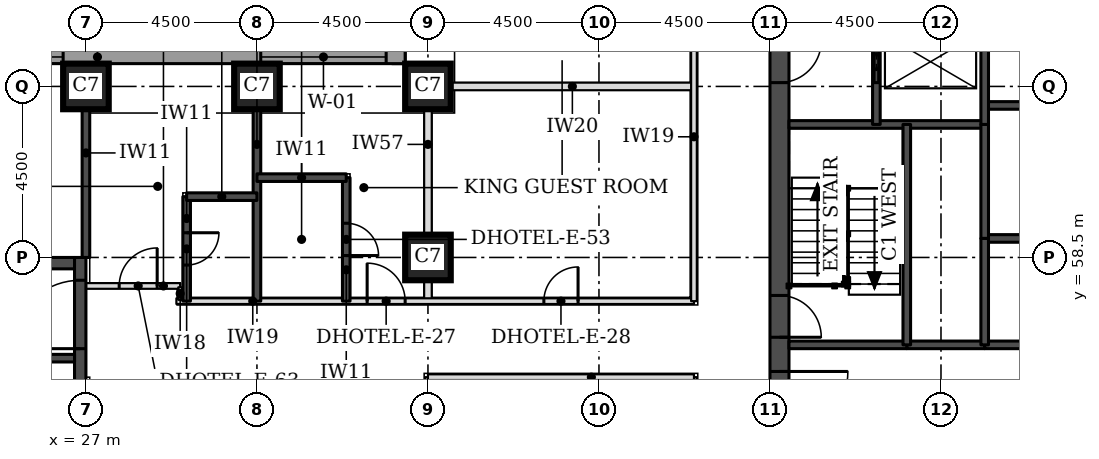
"""IFC4 building model, lengths in metres.
Left out: names, types, materials, properties, quantities, classifications, styles, units other than length and angle.
Written with IfcOpenShell. Run it as: python <this file> out.ifc"""

import sys

from ifc_helpers import new_model, si_unit, direction, frame, frame_2d, origin, origin_2d, place, context, subcontext, project, spatial, rectangle, extrude, element, fill, save


model = new_model("IFC4")
c1 = context("Model", 3, precision=1e-05, world=origin(), true_north=direction((0.0, 1.0)))
c2 = subcontext(c1, "Body", "Model", "MODEL_VIEW")
j1 = project(units=[si_unit("LENGTHUNIT", "METRE"), si_unit("PLANEANGLEUNIT", "RADIAN")], contexts=[c1])
p1 = place(None, origin())
s1 = spatial("IfcSite", under=j1, at=p1, CompositionType="ELEMENT")
p2 = place(p1, origin())
s2 = spatial("IfcBuilding", under=s1, at=p2, CompositionType="ELEMENT")
p3 = place(p2, frame((0.0, 0.0, 62.7)))
s3 = spatial("IfcBuildingStorey", under=s2, at=p3, CompositionType="ELEMENT", Elevation=62.7)
for number, where, z_axis, x_axis in (
    (1, (36.0, 58.5, 0.0), (0.0, 0.0, 1.0), (1.0, 0.0, 0.0)),
    (2, (27.0, 63.0, 0.0), (0.0, 0.0, 1.0), (1.0, 0.0, 0.0)),
    (3, (31.5, 63.0, 0.0), (0.0, 0.0, 1.0), (1.0, 0.0, 0.0)),
    (4, (36.0, 63.0, 0.0), (0.0, 0.0, 1.0), (1.0, 0.0, 0.0)),
):
    element("IfcColumn", number, at=place(p3, frame(where, z_axis=z_axis, x_axis=x_axis)), inside=s3, PredefinedType="COLUMN", context=c2, shape_type="SweptSolid", body=[
        extrude(rectangle(XDim=1.2, YDim=1.2, at=origin_2d()), origin(), (0.0, 0.0, 1.0), 3.3),
    ])
p4 = place(p3, frame((45.25, 49.5, 0.0), z_axis=(0.0, 0.0, 1.0), x_axis=(0.0, 1.0, 0.0)))
e5 = element("IfcWall", 5, at=p4, inside=s3, PredefinedType="SHEAR", context=c2, shape_type="SweptSolid", body=[
    extrude(rectangle(XDim=22.5, YDim=0.5, at=frame_2d((11.25, 0.0))), origin(), (0.0, 0.0, 1.0), 3.3),
])
p5 = place(p4, frame((4.2, 0.0, 0.0)))
e6 = element("IfcOpeningElement", 6, at=p5, cuts=e5, PredefinedType="OPENING", context=c2, shape_type="SweptSolid", body=[
    extrude(rectangle(XDim=1.8, YDim=2.1, at=frame_2d((0.9, 1.05))), frame((0.0, 0.26, 0.0), z_axis=(0.0, -1.0, 0.0), x_axis=(1.0, 0.0, 0.0)), (0.0, 0.0, 1.0), 0.52),
])
p6 = place(p4, frame((6.9, 0.0, 0.0)))
e7 = element("IfcOpeningElement", 7, at=p6, cuts=e5, PredefinedType="OPENING", context=c2, shape_type="SweptSolid", body=[
    extrude(rectangle(XDim=1.1, YDim=2.1, at=frame_2d((0.55, 1.05))), frame((0.0, 0.26, 0.0), z_axis=(0.0, -1.0, 0.0), x_axis=(1.0, 0.0, 0.0)), (0.0, 0.0, 1.0), 0.52),
])
p7 = place(p4, frame((13.6, 0.0, 0.0)))
e8 = element("IfcOpeningElement", 8, at=p7, cuts=e5, PredefinedType="OPENING", context=c2, shape_type="SweptSolid", body=[
    extrude(rectangle(XDim=1.1, YDim=2.1, at=frame_2d((0.55, 1.05))), frame((0.0, 0.26, 0.0), z_axis=(0.0, -1.0, 0.0), x_axis=(1.0, 0.0, 0.0)), (0.0, 0.0, 1.0), 0.52),
])
p8 = place(p4, frame((16.5, 0.0, 0.0)))
e9 = element("IfcOpeningElement", 9, at=p8, cuts=e5, PredefinedType="OPENING", context=c2, shape_type="SweptSolid", body=[
    extrude(rectangle(XDim=1.8, YDim=2.1, at=frame_2d((0.9, 1.05))), frame((0.0, 0.26, 0.0), z_axis=(0.0, -1.0, 0.0), x_axis=(1.0, 0.0, 0.0)), (0.0, 0.0, 1.0), 0.52),
])
p9 = place(p3, frame((18.3, 58.35, 0.0), z_axis=(0.0, 0.0, 1.0), x_axis=(1.0, 0.0, 0.0)))
e10 = element("IfcWall", 10, at=p9, inside=s3, PredefinedType="SHEAR", context=c2, shape_type="SweptSolid", body=[
    extrude(rectangle(XDim=8.4, YDim=0.3, at=frame_2d((4.2, 0.0))), origin(), (0.0, 0.0, 1.0), 3.3),
])
p10 = place(p3, frame((26.85, 49.5, 0.0), z_axis=(0.0, 0.0, 1.0), x_axis=(0.0, 1.0, 0.0)))
e11 = element("IfcWall", 11, at=p10, inside=s3, PredefinedType="SHEAR", context=c2, shape_type="SweptSolid", body=[
    extrude(rectangle(XDim=9.0, YDim=0.3, at=frame_2d((4.5, 0.0))), origin(), (0.0, 0.0, 1.0), 3.3),
])
p11 = place(p10, frame((6.6, 0.0, 0.0)))
e12 = element("IfcOpeningElement", 12, at=p11, cuts=e11, PredefinedType="OPENING", context=c2, shape_type="SweptSolid", body=[
    extrude(rectangle(XDim=1.8, YDim=2.1, at=frame_2d((0.9, 1.05))), frame((0.0, 0.16, 0.0), z_axis=(0.0, -1.0, 0.0), x_axis=(1.0, 0.0, 0.0)), (0.0, 0.0, 1.0), 0.32),
])
p12 = place(p3, frame((35.225, 76.894, 0.0), z_axis=(0.0, 0.0, 1.0), x_axis=(0.0, -1.0, 0.0)))
e13 = element("IfcWall", 13, at=p12, inside=s3, PredefinedType="STANDARD", context=c2, shape_type="SweptSolid", body=[
    extrude(rectangle(XDim=13.293, YDim=0.35, at=frame_2d((6.647, 0.0))), origin(), (0.0, 0.0, 1.0), 3.055),
])
p13 = place(p12, frame((9.493, 0.0, 0.8)))
e14 = element("IfcOpeningElement", 14, at=p13, cuts=e13, PredefinedType="OPENING", context=c2, shape_type="SweptSolid", body=[
    extrude(rectangle(XDim=3.3, YDim=1.5, at=frame_2d((1.65, 0.75))), frame((0.0, 0.185, 0.0), z_axis=(0.0, -1.0, 0.0), x_axis=(1.0, 0.0, 0.0)), (0.0, 0.0, 1.0), 0.37),
])
p14 = place(p3, frame((35.4, 63.775, 0.0), z_axis=(0.0, 0.0, 1.0), x_axis=(-1.0, 0.0, 0.0)))
e15 = element("IfcWall", 15, at=p14, inside=s3, PredefinedType="STANDARD", context=c2, shape_type="SweptSolid", body=[
    extrude(rectangle(XDim=17.793, YDim=0.35, at=frame_2d((8.897, 0.0))), origin(), (0.0, 0.0, 1.0), 3.055),
])
p15 = place(p14, frame((0.5, 0.0, 0.8)))
e16 = element("IfcOpeningElement", 16, at=p15, cuts=e15, PredefinedType="OPENING", context=c2, shape_type="SweptSolid", body=[
    extrude(rectangle(XDim=3.3, YDim=1.5, at=frame_2d((1.65, 0.75))), frame((0.0, 0.185, 0.0), z_axis=(0.0, -1.0, 0.0), x_axis=(1.0, 0.0, 0.0)), (0.0, 0.0, 1.0), 0.37),
])
p16 = place(p14, frame((9.0, 0.0, 0.8)))
e17 = element("IfcOpeningElement", 17, at=p16, cuts=e15, PredefinedType="OPENING", context=c2, shape_type="SweptSolid", body=[
    extrude(rectangle(XDim=3.3, YDim=1.5, at=frame_2d((1.65, 0.75))), frame((0.0, 0.185, 0.0), z_axis=(0.0, -1.0, 0.0), x_axis=(1.0, 0.0, 0.0)), (0.0, 0.0, 1.0), 0.37),
])
p17 = place(p3, frame((36.0, 57.35, 0.0), z_axis=(0.0, 0.0, 1.0), x_axis=(0.0, 1.0, 0.0)))
e18 = element("IfcWall", 18, at=p17, inside=s3, PredefinedType="PARTITIONING", context=c2, shape_type="SweptSolid", body=[
    extrude(rectangle(XDim=5.05, YDim=0.2, at=frame_2d((2.525, 0.0))), origin(), (0.0, 0.0, 1.0), 2.33),
])
p18 = place(p3, frame((36.6, 63.0, 0.0), z_axis=(0.0, 0.0, 1.0), x_axis=(1.0, 0.0, 0.0)))
e19 = element("IfcWall", 19, at=p18, inside=s3, PredefinedType="PARTITIONING", context=c2, shape_type="SweptSolid", body=[
    extrude(rectangle(XDim=6.4, YDim=0.2, at=frame_2d((3.2, 0.0))), origin(), (0.0, 0.0, 1.0), 3.08),
])
p19 = place(p3, frame((43.0, 47.5, 0.0), z_axis=(0.0, 0.0, 1.0), x_axis=(0.0, 1.0, 0.0)))
e20 = element("IfcWall", 20, at=p19, inside=s3, PredefinedType="PARTITIONING", context=c2, shape_type="SweptSolid", body=[
    extrude(rectangle(XDim=7.85, YDim=0.15, at=frame_2d((3.925, 0.0))), origin(), (0.0, 0.0, 1.0), 3.08),
])
p20 = place(p19, frame((3.475, 0.0, 0.0)))
e21 = element("IfcOpeningElement", 21, at=p20, cuts=e20, PredefinedType="OPENING", context=c2, shape_type="SweptSolid", body=[
    extrude(rectangle(XDim=0.9, YDim=2.1, at=frame_2d((0.45, 1.05))), frame((0.0, 0.085, 0.0), z_axis=(0.0, -1.0, 0.0), x_axis=(1.0, 0.0, 0.0)), (0.0, 0.0, 1.0), 0.17),
])
p21 = place(p3, frame((36.0, 54.05, 0.0), z_axis=(0.0, 0.0, 1.0), x_axis=(0.0, 1.0, 0.0)))
e22 = element("IfcWall", 22, at=p21, inside=s3, PredefinedType="PARTITIONING", context=c2, shape_type="SweptSolid", body=[
    extrude(rectangle(XDim=1.3, YDim=0.15, at=frame_2d((0.65, 0.0))), origin(), (0.0, 0.0, 1.0), 2.33),
])
p22 = place(p3, frame((36.0, 55.35, 0.0), z_axis=(0.0, 0.0, 1.0), x_axis=(1.0, 0.0, 0.0)))
e23 = element("IfcWall", 23, at=p22, inside=s3, PredefinedType="PARTITIONING", context=c2, shape_type="SweptSolid", body=[
    extrude(rectangle(XDim=7.0, YDim=0.15, at=frame_2d((3.5, 0.0))), origin(), (0.0, 0.0, 1.0), 3.08),
])
p23 = place(p3, frame((29.38, 57.35, 0.0), z_axis=(0.0, 0.0, 1.0), x_axis=(1.0, 0.0, 0.0)))
e24 = element("IfcWall", 24, at=p23, inside=s3, PredefinedType="PARTITIONING", context=c2, shape_type="SweptSolid", body=[
    extrude(rectangle(XDim=13.62, YDim=0.15, at=frame_2d((6.81, 0.0))), origin(), (0.0, 0.0, 1.0), 3.08),
])
p24 = place(p23, frame((5.02, 0.0, 0.0)))
e25 = element("IfcOpeningElement", 25, at=p24, cuts=e24, PredefinedType="OPENING", context=c2, shape_type="SweptSolid", body=[
    extrude(rectangle(XDim=1.0, YDim=2.1, at=frame_2d((0.5, 1.05))), frame((0.0, 0.085, 0.0), z_axis=(0.0, -1.0, 0.0), x_axis=(1.0, 0.0, 0.0)), (0.0, 0.0, 1.0), 0.17),
])
p25 = place(p23, frame((9.67, 0.0, 0.0)))
e26 = element("IfcOpeningElement", 26, at=p25, cuts=e24, PredefinedType="OPENING", context=c2, shape_type="SweptSolid", body=[
    extrude(rectangle(XDim=0.9, YDim=2.1, at=frame_2d((0.45, 1.05))), frame((0.0, 0.085, 0.0), z_axis=(0.0, -1.0, 0.0), x_axis=(1.0, 0.0, 0.0)), (0.0, 0.0, 1.0), 0.17),
])
p26 = place(p3, frame((43.0, 57.35, 0.0), z_axis=(0.0, 0.0, 1.0), x_axis=(0.0, 1.0, 0.0)))
e27 = element("IfcWall", 27, at=p26, inside=s3, PredefinedType="PARTITIONING", context=c2, shape_type="SweptSolid", body=[
    extrude(rectangle(XDim=16.65, YDim=0.15, at=frame_2d((8.325, 0.0))), origin(), (0.0, 0.0, 1.0), 3.08),
])
p27 = place(p26, frame((8.425, 0.0, 0.0)))
e28 = element("IfcOpeningElement", 28, at=p27, cuts=e27, PredefinedType="OPENING", context=c2, shape_type="SweptSolid", body=[
    extrude(rectangle(XDim=1.0, YDim=2.1, at=frame_2d((0.5, 1.05))), frame((0.0, 0.085, 0.0), z_axis=(0.0, -1.0, 0.0), x_axis=(1.0, 0.0, 0.0)), (0.0, 0.0, 1.0), 0.17),
])
p28 = place(p26, frame((15.203, 0.0, 0.0)))
e29 = element("IfcOpeningElement", 29, at=p28, cuts=e27, PredefinedType="OPENING", context=c2, shape_type="SweptSolid", body=[
    extrude(rectangle(XDim=1.0, YDim=2.1, at=frame_2d((0.5, 1.05))), frame((0.0, 0.085, 0.0), z_axis=(0.0, -1.0, 0.0), x_axis=(1.0, 0.0, 0.0)), (0.0, 0.0, 1.0), 0.17),
])
p29 = place(p3, frame((27.0, 58.5, 0.0), z_axis=(0.0, 0.0, 1.0), x_axis=(0.0, 1.0, 0.0)))
e30 = element("IfcWall", 30, at=p29, inside=s3, PredefinedType="SOLIDWALL", context=c2, shape_type="SweptSolid", body=[
    extrude(rectangle(XDim=3.9, YDim=0.2, at=frame_2d((1.95, 0.0))), origin(), (0.0, 0.0, 1.0), 3.08),
])
p30 = place(p3, frame((29.65, 57.35, 0.0), z_axis=(0.0, 0.0, 1.0), x_axis=(0.0, 1.0, 0.0)))
e31 = element("IfcWall", 31, at=p30, inside=s3, PredefinedType="SOLIDWALL", context=c2, shape_type="SweptSolid", body=[
    extrude(rectangle(XDim=2.75, YDim=0.2, at=frame_2d((1.375, 0.0))), origin(), (0.0, 0.0, 1.0), 3.08),
])
p31 = place(p30, frame((0.95, 0.0, 0.0)))
e32 = element("IfcOpeningElement", 32, at=p31, cuts=e31, PredefinedType="OPENING", context=c2, shape_type="SweptSolid", body=[
    extrude(rectangle(XDim=0.85, YDim=2.1, at=frame_2d((0.425, 1.05))), frame((0.0, 0.11, 0.0), z_axis=(0.0, -1.0, 0.0), x_axis=(1.0, 0.0, 0.0)), (0.0, 0.0, 1.0), 0.22),
])
p32 = place(p3, frame((31.5, 57.35, 0.0), z_axis=(0.0, 0.0, 1.0), x_axis=(0.0, 1.0, 0.0)))
e33 = element("IfcWall", 33, at=p32, inside=s3, PredefinedType="SOLIDWALL", context=c2, shape_type="SweptSolid", body=[
    extrude(rectangle(XDim=5.05, YDim=0.2, at=frame_2d((2.525, 0.0))), origin(), (0.0, 0.0, 1.0), 3.08),
])
p33 = place(p3, frame((33.85, 57.35, 0.0), z_axis=(0.0, 0.0, 1.0), x_axis=(0.0, 1.0, 0.0)))
e34 = element("IfcWall", 34, at=p33, inside=s3, PredefinedType="SOLIDWALL", context=c2, shape_type="SweptSolid", body=[
    extrude(rectangle(XDim=3.25, YDim=0.2, at=frame_2d((1.625, 0.0))), origin(), (0.0, 0.0, 1.0), 3.08),
])
p34 = place(p33, frame((1.2, 0.0, 0.0)))
e35 = element("IfcOpeningElement", 35, at=p34, cuts=e34, PredefinedType="OPENING", context=c2, shape_type="SweptSolid", body=[
    extrude(rectangle(XDim=0.85, YDim=2.1, at=frame_2d((0.425, 1.05))), frame((0.0, 0.11, 0.0), z_axis=(0.0, -1.0, 0.0), x_axis=(1.0, 0.0, 0.0)), (0.0, 0.0, 1.0), 0.22),
])
p35 = place(p3, frame((29.65, 60.1, 0.0), z_axis=(0.0, 0.0, 1.0), x_axis=(1.0, 0.0, 0.0)))
e36 = element("IfcWall", 36, at=p35, inside=s3, PredefinedType="SOLIDWALL", context=c2, shape_type="SweptSolid", body=[
    extrude(rectangle(XDim=1.85, YDim=0.2, at=frame_2d((0.925, 0.0))), origin(), (0.0, 0.0, 1.0), 3.08),
])
p36 = place(p3, frame((31.5, 60.6, 0.0), z_axis=(0.0, 0.0, 1.0), x_axis=(1.0, 0.0, 0.0)))
e37 = element("IfcWall", 37, at=p36, inside=s3, PredefinedType="SOLIDWALL", context=c2, shape_type="SweptSolid", body=[
    extrude(rectangle(XDim=2.35, YDim=0.2, at=frame_2d((1.175, 0.0))), origin(), (0.0, 0.0, 1.0), 3.08),
])
p37 = place(p3, frame((27.0, 57.75, 0.0), z_axis=(0.0, 0.0, 1.0), x_axis=(1.0, 0.0, 0.0)))
e38 = element("IfcWall", 38, at=p37, inside=s3, PredefinedType="PARTITIONING", context=c2, shape_type="SweptSolid", body=[
    extrude(rectangle(XDim=2.48, YDim=0.15, at=frame_2d((1.24, 0.0))), origin(), (0.0, 0.0, 1.0), 3.08),
])
p38 = place(p37, frame((0.875, 0.0, 0.0)))
e39 = element("IfcOpeningElement", 39, at=p38, cuts=e38, PredefinedType="OPENING", context=c2, shape_type="SweptSolid", body=[
    extrude(rectangle(XDim=1.0, YDim=2.1, at=frame_2d((0.5, 1.05))), frame((0.0, 0.085, 0.0), z_axis=(0.0, -1.0, 0.0), x_axis=(1.0, 0.0, 0.0)), (0.0, 0.0, 1.0), 0.17),
])
p39 = place(p3, frame((29.48, 57.385, 0.0), z_axis=(0.0, 0.0, 1.0), x_axis=(0.0, 1.0, 0.0)))
e40 = element("IfcWall", 40, at=p39, inside=s3, PredefinedType="PARTITIONING", context=c2, shape_type="SweptSolid", body=[
    extrude(rectangle(XDim=0.33, YDim=0.1, at=frame_2d((0.165, 0.0))), origin(), (0.0, 0.0, 1.0), 3.08),
])
p40 = place(p3, frame((48.6, 56.2, 0.0), z_axis=(0.0, 0.0, 1.0), x_axis=(1.0, 0.0, 0.0)))
e41 = element("IfcWall", 41, at=p40, inside=s3, PredefinedType="SOLIDWALL", context=c2, shape_type="SweptSolid", body=[
    extrude(rectangle(XDim=2.05, YDim=0.2, at=frame_2d((1.025, 0.0))), origin(), (0.0, 0.0, 1.0), 3.08),
])
p41 = place(p3, frame((45.5, 56.2, 0.0), z_axis=(0.0, 0.0, 1.0), x_axis=(1.0, 0.0, 0.0)))
e42 = element("IfcWall", 42, at=p41, inside=s3, PredefinedType="SOLIDWALL", context=c2, shape_type="SweptSolid", body=[
    extrude(rectangle(XDim=3.1, YDim=0.2, at=frame_2d((1.55, 0.0))), origin(), (0.0, 0.0, 1.0), 3.08),
])
p42 = place(p3, frame((50.65, 56.2, 0.0), z_axis=(0.0, 0.0, 1.0), x_axis=(1.0, 0.0, 0.0)))
e43 = element("IfcWall", 43, at=p42, inside=s3, PredefinedType="SOLIDWALL", context=c2, shape_type="SweptSolid", body=[
    extrude(rectangle(XDim=11.2, YDim=0.2, at=frame_2d((5.6, 0.0))), origin(), (0.0, 0.0, 1.0), 3.08),
])
p43 = place(p3, frame((50.65, 59.0, 0.0), z_axis=(0.0, 0.0, 1.0), x_axis=(1.0, 0.0, 0.0)))
e44 = element("IfcWall", 44, at=p43, inside=s3, PredefinedType="SOLIDWALL", context=c2, shape_type="SweptSolid", body=[
    extrude(rectangle(XDim=11.2, YDim=0.2, at=frame_2d((5.6, 0.0))), origin(), (0.0, 0.0, 1.0), 3.3),
])
p44 = place(p3, frame((45.5, 62.0, 0.0), z_axis=(0.0, 0.0, 1.0), x_axis=(1.0, 0.0, 0.0)))
e45 = element("IfcWall", 45, at=p44, inside=s3, PredefinedType="SOLIDWALL", context=c2, shape_type="SweptSolid", body=[
    extrude(rectangle(XDim=5.15, YDim=0.2, at=frame_2d((2.575, 0.0))), origin(), (0.0, 0.0, 1.0), 3.08),
])
p45 = place(p3, frame((50.65, 62.5, 0.0), z_axis=(0.0, 0.0, 1.0), x_axis=(1.0, 0.0, 0.0)))
e46 = element("IfcWall", 46, at=p45, inside=s3, PredefinedType="SOLIDWALL", context=c2, shape_type="SweptSolid", body=[
    extrude(rectangle(XDim=11.2, YDim=0.2, at=frame_2d((5.6, 0.0))), origin(), (0.0, 0.0, 1.0), 3.3),
])
p46 = place(p3, frame((47.8, 62.0, 0.0), z_axis=(0.0, 0.0, 1.0), x_axis=(0.0, 1.0, 0.0)))
e47 = element("IfcWall", 47, at=p46, inside=s3, PredefinedType="SOLIDWALL", context=c2, shape_type="SweptSolid", body=[
    extrude(rectangle(XDim=3.3, YDim=0.2, at=frame_2d((1.65, 0.0))), origin(), (0.0, 0.0, 1.0), 3.08),
])
p47 = place(p46, frame((1.1, 0.0, 0.0)))
e48 = element("IfcOpeningElement", 48, at=p47, cuts=e47, PredefinedType="OPENING", context=c2, shape_type="SweptSolid", body=[
    extrude(rectangle(XDim=1.1, YDim=2.1, at=frame_2d((0.55, 1.05))), frame((0.0, 0.11, 0.0), z_axis=(0.0, -1.0, 0.0), x_axis=(1.0, 0.0, 0.0)), (0.0, 0.0, 1.0), 0.22),
])
p48 = place(p3, frame((48.6, 56.2, 0.0), z_axis=(0.0, 0.0, 1.0), x_axis=(0.0, 1.0, 0.0)))
e49 = element("IfcWall", 49, at=p48, inside=s3, PredefinedType="SOLIDWALL", context=c2, shape_type="SweptSolid", body=[
    extrude(rectangle(XDim=5.8, YDim=0.2, at=frame_2d((2.9, 0.0))), origin(), (0.0, 0.0, 1.0), 3.08),
])
p49 = place(p3, frame((50.65, 59.0, 0.0), z_axis=(0.0, 0.0, 1.0), x_axis=(0.0, 1.0, 0.0)))
e50 = element("IfcWall", 50, at=p49, inside=s3, PredefinedType="SOLIDWALL", context=c2, shape_type="SweptSolid", body=[
    extrude(rectangle(XDim=3.0, YDim=0.2, at=frame_2d((1.5, 0.0))), origin(), (0.0, 0.0, 1.0), 3.3),
])
p50 = place(p3, frame((50.65, 56.2, 0.0), z_axis=(0.0, 0.0, 1.0), x_axis=(0.0, 1.0, 0.0)))
e51 = element("IfcWall", 51, at=p50, inside=s3, PredefinedType="SOLIDWALL", context=c2, shape_type="SweptSolid", body=[
    extrude(rectangle(XDim=2.8, YDim=0.2, at=frame_2d((1.4, 0.0))), origin(), (0.0, 0.0, 1.0), 3.08),
])
p51 = place(p3, frame((50.65, 62.0, 0.0), z_axis=(0.0, 0.0, 1.0), x_axis=(0.0, 1.0, 0.0)))
e52 = element("IfcWall", 52, at=p51, inside=s3, PredefinedType="SOLIDWALL", context=c2, shape_type="SweptSolid", body=[
    extrude(rectangle(XDim=3.3, YDim=0.2, at=frame_2d((1.65, 0.0))), origin(), (0.0, 0.0, 1.0), 3.08),
])
p52 = place(p3, frame((23.2, 55.85, 0.0), z_axis=(0.0, 0.0, 1.0), x_axis=(1.0, 0.0, 0.0)))
e53 = element("IfcWall", 53, at=p52, inside=s3, PredefinedType="SOLIDWALL", context=c2, shape_type="SweptSolid", body=[
    extrude(rectangle(XDim=3.5, YDim=0.2, at=frame_2d((1.75, 0.0))), origin(), (0.0, 0.0, 1.0), 3.08),
])
p53 = place(p52, frame((1.2, 0.0, 0.0)))
e54 = element("IfcOpeningElement", 54, at=p53, cuts=e53, PredefinedType="OPENING", context=c2, shape_type="SweptSolid", body=[
    extrude(rectangle(XDim=1.1, YDim=2.1, at=frame_2d((0.55, 1.05))), frame((0.0, 0.11, 0.0), z_axis=(0.0, -1.0, 0.0), x_axis=(1.0, 0.0, 0.0)), (0.0, 0.0, 1.0), 0.22),
])
p54 = place(p15, origin())
e55 = element("IfcWindow", 55, at=p54, inside=s3, PartitioningType="SINGLE_PANEL", PredefinedType="WINDOW", context=c2, shape_type="SweptSolid", body=[
    extrude(rectangle(XDim=3.3, YDim=1.5, at=frame_2d((1.65, 0.75))), frame((0.0, 0.085, 0.0), z_axis=(0.0, -1.0, 0.0), x_axis=(1.0, 0.0, 0.0)), (0.0, 0.0, 1.0), 0.06),
])
fill(e16, e55)
p55 = place(p16, origin())
e56 = element("IfcWindow", 56, at=p55, inside=s3, PartitioningType="SINGLE_PANEL", PredefinedType="WINDOW", context=c2, shape_type="SweptSolid", body=[
    extrude(rectangle(XDim=3.3, YDim=1.5, at=frame_2d((1.65, 0.75))), frame((0.0, 0.085, 0.0), z_axis=(0.0, -1.0, 0.0), x_axis=(1.0, 0.0, 0.0)), (0.0, 0.0, 1.0), 0.06),
])
fill(e17, e56)
p56 = place(p24, origin())
e57 = element("IfcDoor", 57, at=p56, inside=s3, OperationType="SINGLE_SWING_LEFT", PredefinedType="DOOR", context=c2, shape_type="SweptSolid", body=[
    extrude(rectangle(XDim=1.0, YDim=2.1, at=frame_2d((0.5, 1.05))), frame((0.0, 0.025, 0.0), z_axis=(0.0, -1.0, 0.0), x_axis=(1.0, 0.0, 0.0)), (0.0, 0.0, 1.0), 0.05),
])
fill(e25, e57)
p57 = place(p34, frame((0.85, 0.0, 0.0), z_axis=(0.0, 0.0, 1.0), x_axis=(-1.0, 0.0, 0.0)))
e58 = element("IfcDoor", 58, at=p57, inside=s3, OperationType="SINGLE_SWING_RIGHT", PredefinedType="DOOR", context=c2, shape_type="SweptSolid", body=[
    extrude(rectangle(XDim=0.85, YDim=2.1, at=frame_2d((0.425, 1.05))), frame((0.0, 0.025, 0.0), z_axis=(0.0, -1.0, 0.0), x_axis=(1.0, 0.0, 0.0)), (0.0, 0.0, 1.0), 0.05),
])
fill(e35, e58)
p58 = place(p31, frame((0.85, 0.0, 0.0), z_axis=(0.0, 0.0, 1.0), x_axis=(-1.0, 0.0, 0.0)))
e59 = element("IfcDoor", 59, at=p58, inside=s3, OperationType="SINGLE_SWING_LEFT", PredefinedType="DOOR", context=c2, shape_type="SweptSolid", body=[
    extrude(rectangle(XDim=0.85, YDim=2.1, at=frame_2d((0.425, 1.05))), frame((0.0, 0.025, 0.0), z_axis=(0.0, -1.0, 0.0), x_axis=(1.0, 0.0, 0.0)), (0.0, 0.0, 1.0), 0.05),
])
fill(e32, e59)
p59 = place(p25, origin())
e60 = element("IfcDoor", 60, at=p59, inside=s3, OperationType="SINGLE_SWING_RIGHT", PredefinedType="DOOR", context=c2, shape_type="SweptSolid", body=[
    extrude(rectangle(XDim=0.9, YDim=2.1, at=frame_2d((0.45, 1.05))), frame((0.0, 0.025, 0.0), z_axis=(0.0, -1.0, 0.0), x_axis=(1.0, 0.0, 0.0)), (0.0, 0.0, 1.0), 0.05),
])
fill(e26, e60)
p60 = place(p38, origin())
e61 = element("IfcDoor", 61, at=p60, inside=s3, OperationType="SINGLE_SWING_RIGHT", PredefinedType="DOOR", context=c2, shape_type="SweptSolid", body=[
    extrude(rectangle(XDim=1.0, YDim=2.1, at=frame_2d((0.5, 1.05))), frame((0.0, 0.025, 0.0), z_axis=(0.0, -1.0, 0.0), x_axis=(1.0, 0.0, 0.0)), (0.0, 0.0, 1.0), 0.05),
])
fill(e39, e61)
p61 = place(p47, origin())
e62 = element("IfcDoor", 62, at=p61, inside=s3, OperationType="DOUBLE_DOOR_SLIDING", PredefinedType="DOOR", context=c2, shape_type="SweptSolid", body=[
    extrude(rectangle(XDim=1.1, YDim=2.1, at=frame_2d((0.55, 1.05))), frame((0.0, 0.025, 0.0), z_axis=(0.0, -1.0, 0.0), x_axis=(1.0, 0.0, 0.0)), (0.0, 0.0, 1.0), 0.05),
])
fill(e48, e62)
p62 = place(p5, frame((1.8, 0.0, 0.0), z_axis=(0.0, 0.0, 1.0), x_axis=(-1.0, 0.0, 0.0)))
e63 = element("IfcDoor", 63, at=p62, inside=s3, OperationType="SINGLE_SWING_LEFT", PredefinedType="DOOR", context=c2, shape_type="SweptSolid", body=[
    extrude(rectangle(XDim=1.8, YDim=2.1, at=frame_2d((0.9, 1.05))), frame((0.0, 0.025, 0.0), z_axis=(0.0, -1.0, 0.0), x_axis=(1.0, 0.0, 0.0)), (0.0, 0.0, 1.0), 0.05),
])
fill(e6, e63)
p63 = place(p6, frame((1.1, 0.0, 0.0), z_axis=(0.0, 0.0, 1.0), x_axis=(-1.0, 0.0, 0.0)))
e64 = element("IfcDoor", 64, at=p63, inside=s3, OperationType="SINGLE_SWING_RIGHT", PredefinedType="DOOR", context=c2, shape_type="SweptSolid", body=[
    extrude(rectangle(XDim=1.1, YDim=2.1, at=frame_2d((0.55, 1.05))), frame((0.0, 0.025, 0.0), z_axis=(0.0, -1.0, 0.0), x_axis=(1.0, 0.0, 0.0)), (0.0, 0.0, 1.0), 0.05),
])
fill(e7, e64)
p64 = place(p7, frame((1.1, 0.0, 0.0), z_axis=(0.0, 0.0, 1.0), x_axis=(-1.0, 0.0, 0.0)))
e65 = element("IfcDoor", 65, at=p64, inside=s3, OperationType="SINGLE_SWING_LEFT", PredefinedType="DOOR", context=c2, shape_type="SweptSolid", body=[
    extrude(rectangle(XDim=1.1, YDim=2.1, at=frame_2d((0.55, 1.05))), frame((0.0, 0.025, 0.0), z_axis=(0.0, -1.0, 0.0), x_axis=(1.0, 0.0, 0.0)), (0.0, 0.0, 1.0), 0.05),
])
fill(e8, e65)
p65 = place(p11, origin())
e66 = element("IfcDoor", 66, at=p65, inside=s3, OperationType="SINGLE_SWING_LEFT", PredefinedType="DOOR", context=c2, shape_type="SweptSolid", body=[
    extrude(rectangle(XDim=1.8, YDim=2.1, at=frame_2d((0.9, 1.05))), frame((0.0, 0.025, 0.0), z_axis=(0.0, -1.0, 0.0), x_axis=(1.0, 0.0, 0.0)), (0.0, 0.0, 1.0), 0.05),
])
fill(e12, e66)
save(model, sys.argv[1])
